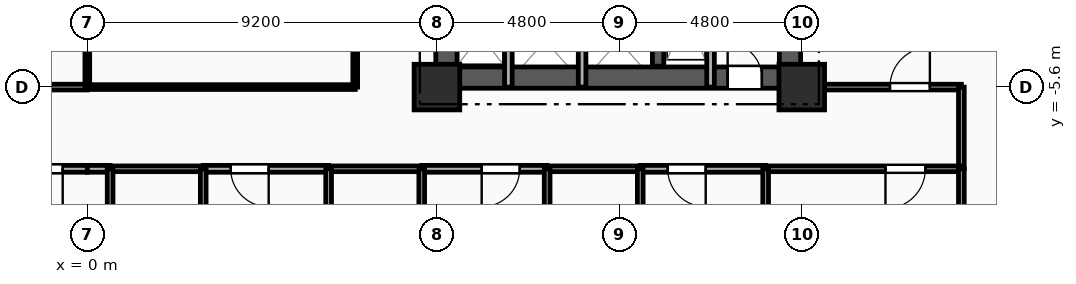
"""IFC4 building model, lengths in metres.
Left out: names, types, materials, properties, quantities, classifications, styles, units other than length and angle.
Written with IfcOpenShell. Run it as: python <this file> out.ifc"""

import sys

from ifc_helpers import new_model, si_unit, direction, frame, frame_2d, origin, origin_2d, place, context, subcontext, project, spatial, rectangle, extrude, element, fill, save


model = new_model("IFC4")
c1 = context("Model", 3, precision=1e-05, world=origin(), true_north=direction((0.0, 1.0)))
c2 = subcontext(c1, "Body", "Model", "MODEL_VIEW")
j1 = project(units=[si_unit("LENGTHUNIT", "METRE"), si_unit("PLANEANGLEUNIT", "RADIAN")], contexts=[c1])
p1 = place(None, origin())
s1 = spatial("IfcSite", under=j1, at=p1, CompositionType="ELEMENT")
p2 = place(p1, origin())
s2 = spatial("IfcBuilding", under=s1, at=p2, CompositionType="ELEMENT")
p3 = place(p2, frame((0.0, 0.0, 63.85)))
s3 = spatial("IfcBuildingStorey", under=s2, at=p3, CompositionType="ELEMENT", Elevation=63.85)
for number, where, z_axis, x_axis in (
    (1, (9.2, -5.6, 0.0), (0.0, 0.0, 1.0), (1.0, 0.0, 0.0)),
    (2, (18.8, -5.6, 0.0), (0.0, 0.0, 1.0), (1.0, 0.0, 0.0)),
):
    element("IfcColumn", number, at=place(p3, frame(where, z_axis=z_axis, x_axis=x_axis)), inside=s3, PredefinedType="COLUMN", context=c2, shape_type="SweptSolid", body=[
        extrude(rectangle(XDim=1.2, YDim=1.2, at=origin_2d()), origin(), (0.0, 0.0, 1.0), 3.35),
    ])
p4 = place(p3, frame((9.2, -5.35, 0.0), z_axis=(0.0, 0.0, 1.0), x_axis=(1.0, 0.0, 0.0)))
e3 = element("IfcWall", 3, at=p4, inside=s3, PredefinedType="SHEAR", context=c2, shape_type="SweptSolid", body=[
    extrude(rectangle(XDim=9.6, YDim=0.56, at=frame_2d((4.8, 0.0))), origin(), (0.0, 0.0, 1.0), 3.035),
])
p5 = place(p4, frame((7.65, 0.0, 0.0)))
e4 = element("IfcOpeningElement", 4, at=p5, cuts=e3, PredefinedType="OPENING", context=c2, shape_type="SweptSolid", body=[
    extrude(rectangle(XDim=0.9, YDim=2.1, at=frame_2d((0.45, 1.05))), frame((0.0, 0.29, 0.0), z_axis=(0.0, -1.0, 0.0), x_axis=(1.0, 0.0, 0.0)), (0.0, 0.0, 1.0), 0.58),
])
p6 = place(p3, frame((9.45, -5.05, 0.0), z_axis=(0.0, 0.0, 1.0), x_axis=(0.0, 1.0, 0.0)))
e5 = element("IfcWall", 5, at=p6, inside=s3, PredefinedType="SHEAR", context=c2, shape_type="SweptSolid", body=[
    extrude(rectangle(XDim=10.1, YDim=0.56, at=frame_2d((5.05, 0.0))), origin(), (0.0, 0.0, 1.0), 3.035),
])
p7 = place(p6, frame((7.15, 0.0, 0.0)))
e6 = element("IfcOpeningElement", 6, at=p7, cuts=e5, PredefinedType="OPENING", context=c2, shape_type="SweptSolid", body=[
    extrude(rectangle(XDim=0.9, YDim=2.1, at=frame_2d((0.45, 1.05))), frame((0.0, 0.29, 0.0), z_axis=(0.0, -1.0, 0.0), x_axis=(1.0, 0.0, 0.0)), (0.0, 0.0, 1.0), 0.58),
])
p8 = place(p6, frame((2.4, 0.0, 0.0)))
e7 = element("IfcOpeningElement", 7, at=p8, cuts=e5, PredefinedType="OPENING", context=c2, shape_type="SweptSolid", body=[
    extrude(rectangle(XDim=1.2, YDim=2.15, at=frame_2d((0.6, 1.075))), frame((0.0, 0.29, 0.0), z_axis=(0.0, -1.0, 0.0), x_axis=(1.0, 0.0, 0.0)), (0.0, 0.0, 1.0), 0.58),
])
p9 = place(p3, frame((18.49, -5.05, 0.0), z_axis=(0.0, 0.0, 1.0), x_axis=(0.0, 1.0, 0.0)))
e8 = element("IfcWall", 8, at=p9, inside=s3, PredefinedType="SHEAR", context=c2, shape_type="SweptSolid", body=[
    extrude(rectangle(XDim=10.1, YDim=0.56, at=frame_2d((5.05, 0.0))), origin(), (0.0, 0.0, 1.0), 3.035),
])
p10 = place(p3, frame((15.02, -5.05, 0.0), z_axis=(0.0, 0.0, 1.0), x_axis=(0.0, 1.0, 0.0)))
e9 = element("IfcWall", 9, at=p10, inside=s3, PredefinedType="SHEAR", context=c2, shape_type="SweptSolid", body=[
    extrude(rectangle(XDim=10.1, YDim=0.3, at=frame_2d((5.05, 0.0))), origin(), (0.0, 0.0, 1.0), 3.035),
])
p11 = place(p3, frame((16.4, -2.11, 0.0), z_axis=(0.0, 0.0, 1.0), x_axis=(0.0, -1.0, 0.0)))
e10 = element("IfcWall", 10, at=p11, inside=s3, PredefinedType="PARTITIONING", context=c2, shape_type="SweptSolid", body=[
    extrude(rectangle(XDim=3.49, YDim=0.2, at=frame_2d((1.745, 0.0))), origin(), (0.0, 0.0, 1.0), 3.035),
])
for number, where, z_axis, x_axis in (
    (11, (11.08, -5.6, 0.0), (0.0, 0.0, 1.0), (0.0, 1.0, 0.0)),
    (12, (13.02, -5.6, 0.0), (0.0, 0.0, 1.0), (0.0, 1.0, 0.0)),
):
    element("IfcWall", number, at=place(p3, frame(where, z_axis=z_axis, x_axis=x_axis)), inside=s3, PredefinedType="PARTITIONING", context=c2, shape_type="SweptSolid", body=[
        extrude(rectangle(XDim=2.25, YDim=0.2, at=frame_2d((1.125, 0.0))), origin(), (0.0, 0.0, 1.0), 3.035),
    ])
p12 = place(p3, frame((0.0, -7.75, 0.0), z_axis=(0.0, 0.0, 1.0), x_axis=(-1.0, 0.0, 0.0)))
e13 = element("IfcWall", 13, at=p12, inside=s3, PredefinedType="PARTITIONING", context=c2, shape_type="SweptSolid", body=[
    extrude(rectangle(XDim=2.7, YDim=0.18, at=frame_2d((1.35, 0.0))), origin(), (0.0, 0.0, 1.0), 3.035),
])
p13 = place(p12, frame((0.647, 0.0, 0.0)))
e14 = element("IfcOpeningElement", 14, at=p13, cuts=e13, PredefinedType="OPENING", context=c2, shape_type="SweptSolid", body=[
    extrude(rectangle(XDim=1.0, YDim=2.15, at=frame_2d((0.5, 1.075))), frame((0.0, 0.1, 0.0), z_axis=(0.0, -1.0, 0.0), x_axis=(1.0, 0.0, 0.0)), (0.0, 0.0, 1.0), 0.2),
])
p14 = place(p3, frame((-7.05, -5.6, 0.0), z_axis=(0.0, 0.0, 1.0), x_axis=(1.0, 0.0, 0.0)))
e15 = element("IfcWall", 15, at=p14, inside=s3, PredefinedType="PARTITIONING", context=c2, shape_type="SweptSolid", body=[
    extrude(rectangle(XDim=7.05, YDim=0.15, at=frame_2d((3.525, 0.0))), origin(), (0.0, 0.0, 1.0), 2.52),
])
p15 = place(p3, frame((18.8, -5.6, 0.0), z_axis=(0.0, 0.0, 1.0), x_axis=(1.0, 0.0, 0.0)))
e16 = element("IfcWall", 16, at=p15, inside=s3, PredefinedType="PARTITIONING", context=c2, shape_type="SweptSolid", body=[
    extrude(rectangle(XDim=4.2, YDim=0.15, at=frame_2d((2.1, 0.0))), origin(), (0.0, 0.0, 1.0), 3.035),
])
p16 = place(p15, frame((2.321, 0.0, 0.0)))
e17 = element("IfcOpeningElement", 17, at=p16, cuts=e16, PredefinedType="OPENING", context=c2, shape_type="SweptSolid", body=[
    extrude(rectangle(XDim=1.05, YDim=2.15, at=frame_2d((0.525, 1.075))), frame((0.0, 0.085, 0.0), z_axis=(0.0, -1.0, 0.0), x_axis=(1.0, 0.0, 0.0)), (0.0, 0.0, 1.0), 0.17),
])
p17 = place(p3, frame((23.0, -5.6, 0.0), z_axis=(0.0, 0.0, 1.0), x_axis=(0.0, -1.0, 0.0)))
e18 = element("IfcWall", 18, at=p17, inside=s3, PredefinedType="PARTITIONING", context=c2, shape_type="SweptSolid", body=[
    extrude(rectangle(XDim=2.15, YDim=0.15, at=frame_2d((1.075, 0.0))), origin(), (0.0, 0.0, 1.0), 3.035),
])
p18 = place(p3, frame((0.6, -7.75, 0.0), z_axis=(0.0, 0.0, 1.0), x_axis=(-1.0, 0.0, 0.0)))
e19 = element("IfcWall", 19, at=p18, inside=s3, PredefinedType="PARTITIONING", context=c2, shape_type="SweptSolid", body=[
    extrude(rectangle(XDim=0.6, YDim=0.18, at=frame_2d((0.3, 0.0))), origin(), (0.0, 0.0, 1.0), 3.035),
])
p19 = place(p3, frame((6.35, -7.75, 0.0), z_axis=(0.0, 0.0, 1.0), x_axis=(-1.0, 0.0, 0.0)))
e20 = element("IfcWall", 20, at=p19, inside=s3, PredefinedType="PARTITIONING", context=c2, shape_type="SweptSolid", body=[
    extrude(rectangle(XDim=3.3, YDim=0.18, at=frame_2d((1.65, 0.0))), origin(), (0.0, 0.0, 1.0), 3.035),
])
p20 = place(p19, frame((1.577, 0.0, 0.0)))
e21 = element("IfcOpeningElement", 21, at=p20, cuts=e20, PredefinedType="OPENING", context=c2, shape_type="SweptSolid", body=[
    extrude(rectangle(XDim=1.0, YDim=2.15, at=frame_2d((0.5, 1.075))), frame((0.0, 0.1, 0.0), z_axis=(0.0, -1.0, 0.0), x_axis=(1.0, 0.0, 0.0)), (0.0, 0.0, 1.0), 0.2),
])
p21 = place(p3, frame((3.05, -7.75, 0.0), z_axis=(0.0, 0.0, 1.0), x_axis=(-1.0, 0.0, 0.0)))
e22 = element("IfcWall", 22, at=p21, inside=s3, PredefinedType="PLUMBINGWALL", context=c2, shape_type="SweptSolid", body=[
    extrude(rectangle(XDim=2.45, YDim=0.15, at=frame_2d((1.225, 0.0))), origin(), (0.0, 0.0, 1.0), 3.035),
])
p22 = place(p3, frame((12.1, -7.75, 0.0), z_axis=(0.0, 0.0, 1.0), x_axis=(-1.0, 0.0, 0.0)))
e23 = element("IfcWall", 23, at=p22, inside=s3, PredefinedType="PARTITIONING", context=c2, shape_type="SweptSolid", body=[
    extrude(rectangle(XDim=3.3, YDim=0.18, at=frame_2d((1.65, 0.0))), origin(), (0.0, 0.0, 1.0), 3.035),
])
p23 = place(p22, frame((0.722, 0.0, 0.0)))
e24 = element("IfcOpeningElement", 24, at=p23, cuts=e23, PredefinedType="OPENING", context=c2, shape_type="SweptSolid", body=[
    extrude(rectangle(XDim=1.0, YDim=2.15, at=frame_2d((0.5, 1.075))), frame((0.0, 0.1, 0.0), z_axis=(0.0, -1.0, 0.0), x_axis=(1.0, 0.0, 0.0)), (0.0, 0.0, 1.0), 0.2),
])
p24 = place(p3, frame((8.8, -7.75, 0.0), z_axis=(0.0, 0.0, 1.0), x_axis=(-1.0, 0.0, 0.0)))
e25 = element("IfcWall", 25, at=p24, inside=s3, PredefinedType="PLUMBINGWALL", context=c2, shape_type="SweptSolid", body=[
    extrude(rectangle(XDim=2.45, YDim=0.15, at=frame_2d((1.225, 0.0))), origin(), (0.0, 0.0, 1.0), 3.035),
])
p25 = place(p3, frame((17.85, -7.75, 0.0), z_axis=(0.0, 0.0, 1.0), x_axis=(-1.0, 0.0, 0.0)))
e26 = element("IfcWall", 26, at=p25, inside=s3, PredefinedType="PARTITIONING", context=c2, shape_type="SweptSolid", body=[
    extrude(rectangle(XDim=3.3, YDim=0.18, at=frame_2d((1.65, 0.0))), origin(), (0.0, 0.0, 1.0), 3.035),
])
p26 = place(p25, frame((1.577, 0.0, 0.0)))
e27 = element("IfcOpeningElement", 27, at=p26, cuts=e26, PredefinedType="OPENING", context=c2, shape_type="SweptSolid", body=[
    extrude(rectangle(XDim=1.0, YDim=2.15, at=frame_2d((0.5, 1.075))), frame((0.0, 0.1, 0.0), z_axis=(0.0, -1.0, 0.0), x_axis=(1.0, 0.0, 0.0)), (0.0, 0.0, 1.0), 0.2),
])
p27 = place(p3, frame((14.55, -7.75, 0.0), z_axis=(0.0, 0.0, 1.0), x_axis=(-1.0, 0.0, 0.0)))
e28 = element("IfcWall", 28, at=p27, inside=s3, PredefinedType="PLUMBINGWALL", context=c2, shape_type="SweptSolid", body=[
    extrude(rectangle(XDim=2.45, YDim=0.15, at=frame_2d((1.225, 0.0))), origin(), (0.0, 0.0, 1.0), 3.035),
])
p28 = place(p3, frame((23.0, -7.75, 0.0), z_axis=(0.0, 0.0, 1.0), x_axis=(-1.0, 0.0, 0.0)))
e29 = element("IfcWall", 29, at=p28, inside=s3, PredefinedType="PARTITIONING", context=c2, shape_type="SweptSolid", body=[
    extrude(rectangle(XDim=5.15, YDim=0.15, at=frame_2d((2.575, 0.0))), origin(), (0.0, 0.0, 1.0), 3.035),
])
p29 = place(p28, frame((0.948, 0.0, 0.0)))
e30 = element("IfcOpeningElement", 30, at=p29, cuts=e29, PredefinedType="OPENING", context=c2, shape_type="SweptSolid", body=[
    extrude(rectangle(XDim=1.05, YDim=2.15, at=frame_2d((0.525, 1.075))), frame((0.0, 0.085, 0.0), z_axis=(0.0, -1.0, 0.0), x_axis=(1.0, 0.0, 0.0)), (0.0, 0.0, 1.0), 0.17),
])
p30 = place(p3, frame((0.0, -5.6, 0.0), z_axis=(0.0, 0.0, 1.0), x_axis=(1.0, 0.0, 0.0)))
e31 = element("IfcWall", 31, at=p30, inside=s3, PredefinedType="PARTITIONING", context=c2, shape_type="SweptSolid", body=[
    extrude(rectangle(XDim=7.05, YDim=0.125, at=frame_2d((3.525, 0.0))), origin(), (0.0, 0.0, 1.0), 2.52),
])
p31 = place(p3, frame((7.05, -5.6, 0.0), z_axis=(0.0, 0.0, 1.0), x_axis=(0.0, 1.0, 0.0)))
e32 = element("IfcWall", 32, at=p31, inside=s3, PredefinedType="PARTITIONING", context=c2, shape_type="SweptSolid", body=[
    extrude(rectangle(XDim=14.1, YDim=0.125, at=frame_2d((7.05, 0.0))), origin(), (0.0, 0.0, 1.0), 3.035),
])
p32 = place(p31, frame((5.076, 0.0, 0.0)))
e33 = element("IfcOpeningElement", 33, at=p32, cuts=e32, PredefinedType="OPENING", context=c2, shape_type="SweptSolid", body=[
    extrude(rectangle(XDim=0.95, YDim=2.1, at=frame_2d((0.475, 1.05))), frame((0.0, 0.073, 0.0), z_axis=(0.0, -1.0, 0.0), x_axis=(1.0, 0.0, 0.0)), (0.0, 0.0, 1.0), 0.145),
])
p33 = place(p3, frame((23.0, -19.4, 0.0), z_axis=(0.0, 0.0, 1.0), x_axis=(0.0, 1.0, 0.0)))
e34 = element("IfcWall", 34, at=p33, inside=s3, PredefinedType="PARTITIONING", context=c2, shape_type="SweptSolid", body=[
    extrude(rectangle(XDim=11.65, YDim=0.15, at=frame_2d((5.825, 0.0))), origin(), (0.0, 0.0, 1.0), 3.035),
])
for number, where, z_axis, x_axis in (
    (35, (0.6, -7.75, 0.0), (0.0, 0.0, 1.0), (0.0, -1.0, 0.0)),
    (36, (3.05, -9.9, 0.0), (0.0, 0.0, 1.0), (0.0, 1.0, 0.0)),
    (37, (6.35, -7.75, 0.0), (0.0, 0.0, 1.0), (0.0, -1.0, 0.0)),
    (38, (8.8, -9.9, 0.0), (0.0, 0.0, 1.0), (0.0, 1.0, 0.0)),
    (39, (12.1, -7.75, 0.0), (0.0, 0.0, 1.0), (0.0, -1.0, 0.0)),
    (40, (14.55, -9.9, 0.0), (0.0, 0.0, 1.0), (0.0, 1.0, 0.0)),
):
    element("IfcWall", number, at=place(p3, frame(where, z_axis=z_axis, x_axis=x_axis)), inside=s3, PredefinedType="PLUMBINGWALL", context=c2, shape_type="SweptSolid", body=[
        extrude(rectangle(XDim=2.15, YDim=0.15, at=frame_2d((1.075, 0.0))), origin(), (0.0, 0.0, 1.0), 3.035),
    ])
p34 = place(p3, frame((17.85, -7.75, 0.0), z_axis=(0.0, 0.0, 1.0), x_axis=(0.0, -1.0, 0.0)))
e41 = element("IfcWall", 41, at=p34, inside=s3, PredefinedType="PARTITIONING", context=c2, shape_type="SweptSolid", body=[
    extrude(rectangle(XDim=11.65, YDim=0.15, at=frame_2d((5.825, 0.0))), origin(), (0.0, 0.0, 1.0), 3.035),
])
p35 = place(p3, frame((0.0, 8.5, 0.0), z_axis=(0.0, 0.0, 1.0), x_axis=(0.0, -1.0, 0.0)))
e42 = element("IfcWall", 42, at=p35, inside=s3, PredefinedType="PARTITIONING", context=c2, shape_type="SweptSolid", body=[
    extrude(rectangle(XDim=14.1, YDim=0.125, at=frame_2d((7.05, 0.0))), origin(), (0.0, 0.0, 1.0), 3.035),
])
p36 = place(p5, origin())
e43 = element("IfcDoor", 43, at=p36, inside=s3, OperationType="SINGLE_SWING_LEFT", PredefinedType="DOOR", context=c2, shape_type="SweptSolid", body=[
    extrude(rectangle(XDim=0.9, YDim=2.1, at=frame_2d((0.45, 1.05))), frame((0.0, 0.025, 0.0), z_axis=(0.0, -1.0, 0.0), x_axis=(1.0, 0.0, 0.0)), (0.0, 0.0, 1.0), 0.05),
])
fill(e4, e43)
p37 = place(p13, origin())
e44 = element("IfcDoor", 44, at=p37, inside=s3, OperationType="SINGLE_SWING_LEFT", PredefinedType="DOOR", context=c2, shape_type="SweptSolid", body=[
    extrude(rectangle(XDim=1.0, YDim=2.15, at=frame_2d((0.5, 1.075))), frame((0.0, 0.025, 0.0), z_axis=(0.0, -1.0, 0.0), x_axis=(1.0, 0.0, 0.0)), (0.0, 0.0, 1.0), 0.05),
])
fill(e14, e44)
p38 = place(p16, origin())
e45 = element("IfcDoor", 45, at=p38, inside=s3, OperationType="SINGLE_SWING_RIGHT", PredefinedType="DOOR", context=c2, shape_type="SweptSolid", body=[
    extrude(rectangle(XDim=1.05, YDim=2.15, at=frame_2d((0.525, 1.075))), frame((0.0, 0.025, 0.0), z_axis=(0.0, -1.0, 0.0), x_axis=(1.0, 0.0, 0.0)), (0.0, 0.0, 1.0), 0.05),
])
fill(e17, e45)
p39 = place(p20, origin())
e46 = element("IfcDoor", 46, at=p39, inside=s3, OperationType="SINGLE_SWING_LEFT", PredefinedType="DOOR", context=c2, shape_type="SweptSolid", body=[
    extrude(rectangle(XDim=1.0, YDim=2.15, at=frame_2d((0.5, 1.075))), frame((0.0, 0.025, 0.0), z_axis=(0.0, -1.0, 0.0), x_axis=(1.0, 0.0, 0.0)), (0.0, 0.0, 1.0), 0.05),
])
fill(e21, e46)
p40 = place(p23, origin())
e47 = element("IfcDoor", 47, at=p40, inside=s3, OperationType="SINGLE_SWING_RIGHT", PredefinedType="DOOR", context=c2, shape_type="SweptSolid", body=[
    extrude(rectangle(XDim=1.0, YDim=2.15, at=frame_2d((0.5, 1.075))), frame((0.0, 0.025, 0.0), z_axis=(0.0, -1.0, 0.0), x_axis=(1.0, 0.0, 0.0)), (0.0, 0.0, 1.0), 0.05),
])
fill(e24, e47)
p41 = place(p26, origin())
e48 = element("IfcDoor", 48, at=p41, inside=s3, OperationType="SINGLE_SWING_LEFT", PredefinedType="DOOR", context=c2, shape_type="SweptSolid", body=[
    extrude(rectangle(XDim=1.0, YDim=2.15, at=frame_2d((0.5, 1.075))), frame((0.0, 0.025, 0.0), z_axis=(0.0, -1.0, 0.0), x_axis=(1.0, 0.0, 0.0)), (0.0, 0.0, 1.0), 0.05),
])
fill(e27, e48)
p42 = place(p29, origin())
e49 = element("IfcDoor", 49, at=p42, inside=s3, OperationType="SINGLE_SWING_RIGHT", PredefinedType="DOOR", context=c2, shape_type="SweptSolid", body=[
    extrude(rectangle(XDim=1.05, YDim=2.15, at=frame_2d((0.525, 1.075))), frame((0.0, 0.025, 0.0), z_axis=(0.0, -1.0, 0.0), x_axis=(1.0, 0.0, 0.0)), (0.0, 0.0, 1.0), 0.05),
])
fill(e30, e49)
save(model, sys.argv[1])
